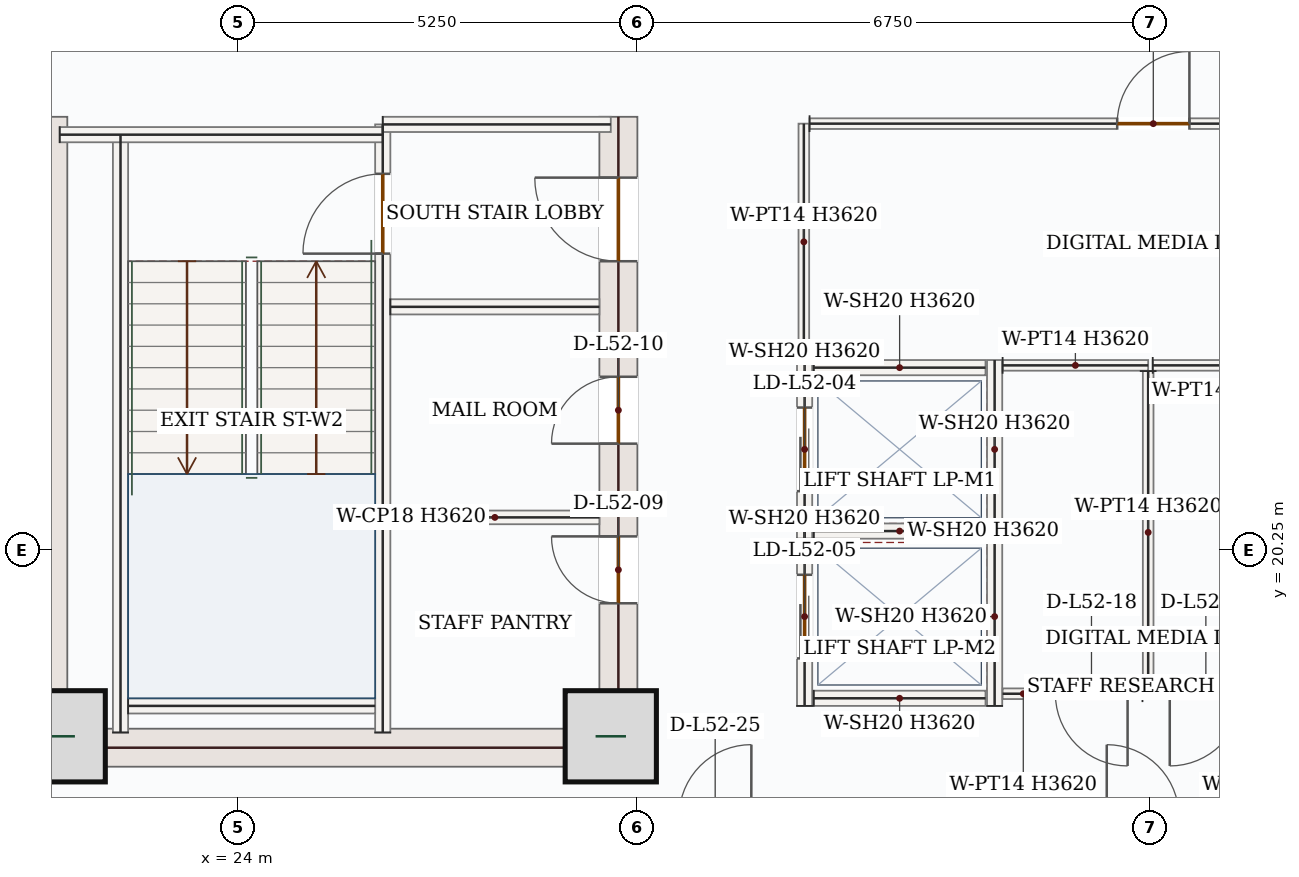
"""IFC4 building model, lengths in metres.
Left out: names, types, materials, properties, quantities, classifications, styles, units other than length and angle.
Written with IfcOpenShell. Run it as: python <this file> out.ifc"""

import sys

from ifc_helpers import new_model, si_unit, direction, frame, frame_2d, origin, origin_2d, place, context, subcontext, project, spatial, rectangle, extrude, source, transform, mapped, element, fill, save


model = new_model("IFC4")
c1 = context("Model", 3, precision=1e-05, world=origin(), true_north=direction((0.0, 1.0)))
c2 = subcontext(c1, "Body", "Model", "MODEL_VIEW")
j1 = project(units=[si_unit("LENGTHUNIT", "METRE"), si_unit("PLANEANGLEUNIT", "RADIAN")], contexts=[c1])
p1 = place(None, origin())
s1 = spatial("IfcSite", under=j1, at=p1, CompositionType="ELEMENT")
p2 = place(p1, origin())
s2 = spatial("IfcBuilding", under=s1, at=p2, CompositionType="ELEMENT")
p3 = place(p2, frame((0.0, 0.0, 221.4)))
s3 = spatial("IfcBuildingStorey", under=s2, at=p3, CompositionType="ELEMENT", Elevation=221.4)
m1 = source(origin(), c2, "Body", "SweptSolid", [
    extrude(rectangle(XDim=8.55, YDim=0.5, at=frame_2d((4.275, 0.0))), origin(), (0.0, 0.0, 1.0), 3.62),
])
p4 = place(p3, frame((21.5, 17.4, 0.0), z_axis=(0.0, 0.0, 1.0), x_axis=(0.0, 1.0, 0.0)))
e1 = element("IfcWall", 1, at=p4, inside=s3, PredefinedType="SHEAR", context=c2, shape_type="MappedRepresentation", body=[
    mapped(m1, transform((0.0, 0.0, 0.0), x_axis=(1.0, 0.0, 0.0), y_axis=(0.0, 1.0, 0.0), z_axis=(0.0, 0.0, 1.0), scale=1.0)),
])
p5 = place(p3, frame((29.0, 17.4, 0.0), z_axis=(0.0, 0.0, 1.0), x_axis=(0.0, 1.0, 0.0)))
e2 = element("IfcWall", 2, at=p5, inside=s3, PredefinedType="SHEAR", context=c2, shape_type="SweptSolid", body=[
    extrude(rectangle(XDim=8.55, YDim=0.5, at=frame_2d((4.275, 0.0))), origin(), (0.0, 0.0, 1.0), 3.62),
])
p6 = place(p5, frame((6.65, 0.0, 0.0)))
e3 = element("IfcOpeningElement", 3, at=p6, cuts=e2, PredefinedType="OPENING", context=c2, shape_type="SweptSolid", body=[
    extrude(rectangle(XDim=1.1, YDim=2.2, at=frame_2d((0.55, 1.1))), frame((0.0, 0.26, 0.0), z_axis=(0.0, -1.0, 0.0), x_axis=(1.0, 0.0, 0.0)), (0.0, 0.0, 1.0), 0.52),
])
p7 = place(p5, frame((2.15, 0.0, 0.0)))
e4 = element("IfcOpeningElement", 4, at=p7, cuts=e2, PredefinedType="OPENING", context=c2, shape_type="SweptSolid", body=[
    extrude(rectangle(XDim=0.88, YDim=2.1, at=frame_2d((0.44, 1.05))), frame((0.0, 0.26, 0.0), z_axis=(0.0, -1.0, 0.0), x_axis=(1.0, 0.0, 0.0)), (0.0, 0.0, 1.0), 0.52),
])
p8 = place(p5, frame((4.25, 0.0, 0.0)))
e5 = element("IfcOpeningElement", 5, at=p8, cuts=e2, PredefinedType="OPENING", context=c2, shape_type="SweptSolid", body=[
    extrude(rectangle(XDim=0.88, YDim=2.1, at=frame_2d((0.44, 1.05))), frame((0.0, 0.26, 0.0), z_axis=(0.0, -1.0, 0.0), x_axis=(1.0, 0.0, 0.0)), (0.0, 0.0, 1.0), 0.52),
])
m2 = source(origin(), c2, "Body", "SweptSolid", [
    extrude(rectangle(XDim=7.0, YDim=0.5, at=frame_2d((3.5, 0.0))), origin(), (0.0, 0.0, 1.0), 3.62),
])
p9 = place(p3, frame((21.75, 17.65, 0.0), z_axis=(0.0, 0.0, 1.0), x_axis=(1.0, 0.0, 0.0)))
e6 = element("IfcWall", 6, at=p9, inside=s3, PredefinedType="SHEAR", context=c2, shape_type="MappedRepresentation", body=[
    mapped(m2, transform((0.0, 0.0, 0.0), x_axis=(1.0, 0.0, 0.0), y_axis=(0.0, 1.0, 0.0), z_axis=(0.0, 0.0, 1.0), scale=1.0)),
])
m3 = source(origin(), c2, "Body", "SweptSolid", [
    extrude(rectangle(XDim=1.2, YDim=1.2, at=origin_2d()), origin(), (0.0, 0.0, 1.0), 3.9),
])
for number, where, z_axis, x_axis in (
    (7, (21.65, 17.8, 0.0), (0.0, 0.0, 1.0), (1.0, 0.0, 0.0)),
    (8, (28.9, 17.8, 0.0), (0.0, 0.0, 1.0), (1.0, 0.0, 0.0)),
):
    element("IfcColumn", number, at=place(p3, frame(where, z_axis=z_axis, x_axis=x_axis)), inside=s3, PredefinedType="COLUMN", context=c2, shape_type="MappedRepresentation", body=[
        mapped(m3, transform((0.0, 0.0, 0.0), x_axis=(1.0, 0.0, 0.0), y_axis=(0.0, 1.0, 0.0), z_axis=(0.0, 0.0, 1.0), scale=1.0)),
    ])
m4 = source(origin(), c2, "Body", "SweptSolid", [
    extrude(rectangle(XDim=7.87, YDim=0.2, at=frame_2d((3.935, 0.0))), origin(), (0.0, 0.0, 1.0), 3.62),
])
p10 = place(p3, frame((22.45, 17.85, 0.0), z_axis=(0.0, 0.0, 1.0), x_axis=(0.0, 1.0, 0.0)))
e9 = element("IfcWall", 9, at=p10, inside=s3, PredefinedType="SOLIDWALL", context=c2, shape_type="MappedRepresentation", body=[
    mapped(m4, transform((0.0, 0.0, 0.0), x_axis=(1.0, 0.0, 0.0), y_axis=(0.0, 1.0, 0.0), z_axis=(0.0, 0.0, 1.0), scale=1.0)),
])
p11 = place(p3, frame((25.9, 17.85, 0.0), z_axis=(0.0, 0.0, 1.0), x_axis=(0.0, 1.0, 0.0)))
e10 = element("IfcWall", 10, at=p11, inside=s3, PredefinedType="SOLIDWALL", context=c2, shape_type="SweptSolid", body=[
    extrude(rectangle(XDim=8.0, YDim=0.2, at=frame_2d((4.0, 0.0))), origin(), (0.0, 0.0, 1.0), 3.62),
])
p12 = place(p11, frame((6.3, 0.0, 0.0)))
e11 = element("IfcOpeningElement", 11, at=p12, cuts=e10, PredefinedType="OPENING", context=c2, shape_type="SweptSolid", body=[
    extrude(rectangle(XDim=1.05, YDim=2.15, at=frame_2d((0.525, 1.075))), frame((0.0, 0.11, 0.0), z_axis=(0.0, -1.0, 0.0), x_axis=(1.0, 0.0, 0.0)), (0.0, 0.0, 1.0), 0.22),
])
m5 = source(origin(), c2, "Body", "SweptSolid", [
    extrude(rectangle(XDim=4.25, YDim=0.2, at=frame_2d((2.125, 0.0))), origin(), (0.0, 0.0, 1.0), 3.62),
])
p13 = place(p3, frame((21.65, 25.715, 0.0), z_axis=(0.0, 0.0, 1.0), x_axis=(1.0, 0.0, 0.0)))
e12 = element("IfcWall", 12, at=p13, inside=s3, PredefinedType="SOLIDWALL", context=c2, shape_type="MappedRepresentation", body=[
    mapped(m5, transform((0.0, 0.0, 0.0), x_axis=(1.0, 0.0, 0.0), y_axis=(0.0, 1.0, 0.0), z_axis=(0.0, 0.0, 1.0), scale=1.0)),
])
m6 = source(origin(), c2, "Body", "SweptSolid", [
    extrude(rectangle(XDim=3.0, YDim=0.2, at=frame_2d((1.5, 0.0))), origin(), (0.0, 0.0, 1.0), 3.62),
])
p14 = place(p3, frame((25.9, 25.85, 0.0), z_axis=(0.0, 0.0, 1.0), x_axis=(1.0, 0.0, 0.0)))
e13 = element("IfcWall", 13, at=p14, inside=s3, PredefinedType="SOLIDWALL", context=c2, shape_type="MappedRepresentation", body=[
    mapped(m6, transform((0.0, 0.0, 0.0), x_axis=(1.0, 0.0, 0.0), y_axis=(0.0, 1.0, 0.0), z_axis=(0.0, 0.0, 1.0), scale=1.0)),
])
m7 = source(origin(), c2, "Body", "SweptSolid", [
    extrude(rectangle(XDim=3.25, YDim=0.2, at=frame_2d((1.625, 0.0))), origin(), (0.0, 0.0, 1.0), 3.62),
])
p15 = place(p3, frame((22.55, 18.2, 0.0), z_axis=(0.0, 0.0, 1.0), x_axis=(1.0, 0.0, 0.0)))
e14 = element("IfcWall", 14, at=p15, inside=s3, PredefinedType="SOLIDWALL", context=c2, shape_type="MappedRepresentation", body=[
    mapped(m7, transform((0.0, 0.0, 0.0), x_axis=(1.0, 0.0, 0.0), y_axis=(0.0, 1.0, 0.0), z_axis=(0.0, 0.0, 1.0), scale=1.0)),
])
m8 = source(origin(), c2, "Body", "SweptSolid", [
    extrude(rectangle(XDim=2.75, YDim=0.2, at=frame_2d((1.375, 0.0))), origin(), (0.0, 0.0, 1.0), 3.62),
])
p16 = place(p3, frame((26.0, 23.45, 0.0), z_axis=(0.0, 0.0, 1.0), x_axis=(1.0, 0.0, 0.0)))
e15 = element("IfcWall", 15, at=p16, inside=s3, PredefinedType="SOLIDWALL", context=c2, shape_type="MappedRepresentation", body=[
    mapped(m8, transform((0.0, 0.0, 0.0), x_axis=(1.0, 0.0, 0.0), y_axis=(0.0, 1.0, 0.0), z_axis=(0.0, 0.0, 1.0), scale=1.0)),
])
m9 = source(origin(), c2, "Body", "SweptSolid", [
    extrude(rectangle(XDim=2.75, YDim=0.18, at=frame_2d((1.375, 0.0))), origin(), (0.0, 0.0, 1.0), 3.62),
])
p17 = place(p3, frame((26.0, 20.68, 0.0), z_axis=(0.0, 0.0, 1.0), x_axis=(1.0, 0.0, 0.0)))
e16 = element("IfcWall", 16, at=p17, inside=s3, PredefinedType="PARTITIONING", context=c2, shape_type="MappedRepresentation", body=[
    mapped(m9, transform((0.0, 0.0, 0.0), x_axis=(1.0, 0.0, 0.0), y_axis=(0.0, 1.0, 0.0), z_axis=(0.0, 0.0, 1.0), scale=1.0)),
])
p18 = place(p3, frame((31.45, 20.4, 0.0), z_axis=(0.0, 0.0, 1.0), x_axis=(0.0, 1.0, 0.0)))
e17 = element("IfcWall", 17, at=p18, inside=s3, PredefinedType="SOLIDWALL", context=c2, shape_type="SweptSolid", body=[
    extrude(rectangle(XDim=2.35, YDim=0.2, at=frame_2d((1.175, 0.0))), origin(), (0.0, 0.0, 1.0), 3.62),
])
p19 = place(p18, frame((0.625, 0.0, 0.0)))
e18 = element("IfcOpeningElement", 18, at=p19, cuts=e17, PredefinedType="OPENING", context=c2, shape_type="SweptSolid", body=[
    extrude(rectangle(XDim=1.1, YDim=2.15, at=frame_2d((0.55, 1.075))), frame((0.0, 0.11, 0.0), z_axis=(0.0, -1.0, 0.0), x_axis=(1.0, 0.0, 0.0)), (0.0, 0.0, 1.0), 0.22),
])
m10 = source(origin(), c2, "Body", "SweptSolid", [
    extrude(rectangle(XDim=2.35, YDim=0.2, at=frame_2d((1.175, 0.0))), origin(), (0.0, 0.0, 1.0), 3.62),
])
p20 = place(p3, frame((33.95, 20.4, 0.0), z_axis=(0.0, 0.0, 1.0), x_axis=(0.0, 1.0, 0.0)))
e19 = element("IfcWall", 19, at=p20, inside=s3, PredefinedType="SOLIDWALL", context=c2, shape_type="MappedRepresentation", body=[
    mapped(m10, transform((0.0, 0.0, 0.0), x_axis=(1.0, 0.0, 0.0), y_axis=(0.0, 1.0, 0.0), z_axis=(0.0, 0.0, 1.0), scale=1.0)),
])
m11 = source(origin(), c2, "Body", "SweptSolid", [
    extrude(rectangle(XDim=2.26, YDim=0.2, at=frame_2d((1.13, 0.0))), origin(), (0.0, 0.0, 1.0), 3.62),
])
for number, where, z_axis, x_axis in (
    (20, (31.57, 20.5, 0.0), (0.0, 0.0, 1.0), (1.0, 0.0, 0.0)),
    (21, (31.57, 22.65, 0.0), (0.0, 0.0, 1.0), (1.0, 0.0, 0.0)),
):
    element("IfcWall", number, at=place(p3, frame(where, z_axis=z_axis, x_axis=x_axis)), inside=s3, PredefinedType="SOLIDWALL", context=c2, shape_type="MappedRepresentation", body=[
        mapped(m11, transform((0.0, 0.0, 0.0), x_axis=(1.0, 0.0, 0.0), y_axis=(0.0, 1.0, 0.0), z_axis=(0.0, 0.0, 1.0), scale=1.0)),
    ])
p21 = place(p3, frame((31.45, 18.2, 0.0), z_axis=(0.0, 0.0, 1.0), x_axis=(0.0, 1.0, 0.0)))
e22 = element("IfcWall", 22, at=p21, inside=s3, PredefinedType="SOLIDWALL", context=c2, shape_type="SweptSolid", body=[
    extrude(rectangle(XDim=2.35, YDim=0.2, at=frame_2d((1.175, 0.0))), origin(), (0.0, 0.0, 1.0), 3.62),
])
p22 = place(p21, frame((0.625, 0.0, 0.0)))
e23 = element("IfcOpeningElement", 23, at=p22, cuts=e22, PredefinedType="OPENING", context=c2, shape_type="SweptSolid", body=[
    extrude(rectangle(XDim=1.1, YDim=2.15, at=frame_2d((0.55, 1.075))), frame((0.0, 0.11, 0.0), z_axis=(0.0, -1.0, 0.0), x_axis=(1.0, 0.0, 0.0)), (0.0, 0.0, 1.0), 0.22),
])
p23 = place(p3, frame((33.95, 18.2, 0.0), z_axis=(0.0, 0.0, 1.0), x_axis=(0.0, 1.0, 0.0)))
e24 = element("IfcWall", 24, at=p23, inside=s3, PredefinedType="SOLIDWALL", context=c2, shape_type="MappedRepresentation", body=[
    mapped(m10, transform((0.0, 0.0, 0.0), x_axis=(1.0, 0.0, 0.0), y_axis=(0.0, 1.0, 0.0), z_axis=(0.0, 0.0, 1.0), scale=1.0)),
])
p24 = place(p3, frame((31.57, 18.3, 0.0), z_axis=(0.0, 0.0, 1.0), x_axis=(1.0, 0.0, 0.0)))
e25 = element("IfcWall", 25, at=p24, inside=s3, PredefinedType="SOLIDWALL", context=c2, shape_type="MappedRepresentation", body=[
    mapped(m11, transform((0.0, 0.0, 0.0), x_axis=(1.0, 0.0, 0.0), y_axis=(0.0, 1.0, 0.0), z_axis=(0.0, 0.0, 1.0), scale=1.0)),
])
m12 = source(origin(), c2, "Body", "SweptSolid", [
    extrude(rectangle(XDim=1.915, YDim=0.14, at=frame_2d((0.958, 0.0))), origin(), (0.0, 0.0, 1.0), 3.62),
])
p25 = place(p3, frame((34.055, 22.68, 0.0), z_axis=(0.0, 0.0, 1.0), x_axis=(1.0, 0.0, 0.0)))
e26 = element("IfcWall", 26, at=p25, inside=s3, PredefinedType="PARTITIONING", context=c2, shape_type="MappedRepresentation", body=[
    mapped(m12, transform((0.0, 0.0, 0.0), x_axis=(1.0, 0.0, 0.0), y_axis=(0.0, 1.0, 0.0), z_axis=(0.0, 0.0, 1.0), scale=1.0)),
])
m13 = source(origin(), c2, "Body", "SweptSolid", [
    extrude(rectangle(XDim=4.245, YDim=0.14, at=frame_2d((2.123, 0.0))), origin(), (0.0, 0.0, 1.0), 3.62),
])
p26 = place(p3, frame((35.97, 22.605, 0.0), z_axis=(0.0, 0.0, 1.0), x_axis=(0.0, -1.0, 0.0)))
e27 = element("IfcWall", 27, at=p26, inside=s3, PredefinedType="PARTITIONING", context=c2, shape_type="MappedRepresentation", body=[
    mapped(m13, transform((0.0, 0.0, 0.0), x_axis=(1.0, 0.0, 0.0), y_axis=(0.0, 1.0, 0.0), z_axis=(0.0, 0.0, 1.0), scale=1.0)),
])
p27 = place(p3, frame((35.895, 18.36, 0.0), z_axis=(0.0, 0.0, 1.0), x_axis=(-1.0, 0.0, 0.0)))
e28 = element("IfcWall", 28, at=p27, inside=s3, PredefinedType="PARTITIONING", context=c2, shape_type="SweptSolid", body=[
    extrude(rectangle(XDim=1.84, YDim=0.14, at=frame_2d((0.92, 0.0))), origin(), (0.0, 0.0, 1.0), 3.62),
])
p28 = place(p27, frame((0.196, 0.0, 0.0)))
e29 = element("IfcOpeningElement", 29, at=p28, cuts=e28, PredefinedType="OPENING", context=c2, shape_type="SweptSolid", body=[
    extrude(rectangle(XDim=0.95, YDim=2.15, at=frame_2d((0.475, 1.075))), frame((0.0, 0.08, 0.0), z_axis=(0.0, -1.0, 0.0), x_axis=(1.0, 0.0, 0.0)), (0.0, 0.0, 1.0), 0.16),
])
p29 = place(p3, frame((36.03, 22.68, 0.0), z_axis=(0.0, 0.0, 1.0), x_axis=(1.0, 0.0, 0.0)))
e30 = element("IfcWall", 30, at=p29, inside=s3, PredefinedType="PARTITIONING", context=c2, shape_type="MappedRepresentation", body=[
    mapped(m12, transform((0.0, 0.0, 0.0), x_axis=(1.0, 0.0, 0.0), y_axis=(0.0, 1.0, 0.0), z_axis=(0.0, 0.0, 1.0), scale=1.0)),
])
p30 = place(p3, frame((37.945, 18.36, 0.0), z_axis=(0.0, 0.0, 1.0), x_axis=(-1.0, 0.0, 0.0)))
e31 = element("IfcWall", 31, at=p30, inside=s3, PredefinedType="PARTITIONING", context=c2, shape_type="SweptSolid", body=[
    extrude(rectangle(XDim=1.9, YDim=0.14, at=frame_2d((0.95, 0.0))), origin(), (0.0, 0.0, 1.0), 3.62),
])
p31 = place(p30, frame((0.741, 0.0, 0.0)))
e32 = element("IfcOpeningElement", 32, at=p31, cuts=e31, PredefinedType="OPENING", context=c2, shape_type="SweptSolid", body=[
    extrude(rectangle(XDim=0.95, YDim=2.15, at=frame_2d((0.475, 1.075))), frame((0.0, 0.08, 0.0), z_axis=(0.0, -1.0, 0.0), x_axis=(1.0, 0.0, 0.0)), (0.0, 0.0, 1.0), 0.16),
])
m14 = source(origin(), c2, "Body", "SweptSolid", [
    extrude(rectangle(XDim=3.11, YDim=0.14, at=frame_2d((1.555, 0.0))), origin(), (0.0, 0.0, 1.0), 3.62),
])
p32 = place(p3, frame((31.44, 22.75, 0.0), z_axis=(0.0, 0.0, 1.0), x_axis=(0.0, 1.0, 0.0)))
e33 = element("IfcWall", 33, at=p32, inside=s3, PredefinedType="PARTITIONING", context=c2, shape_type="MappedRepresentation", body=[
    mapped(m14, transform((0.0, 0.0, 0.0), x_axis=(1.0, 0.0, 0.0), y_axis=(0.0, 1.0, 0.0), z_axis=(0.0, 0.0, 1.0), scale=1.0)),
])
p33 = place(p3, frame((31.515, 25.86, 0.0), z_axis=(0.0, 0.0, 1.0), x_axis=(1.0, 0.0, 0.0)))
e34 = element("IfcWall", 34, at=p33, inside=s3, PredefinedType="PARTITIONING", context=c2, shape_type="SweptSolid", body=[
    extrude(rectangle(XDim=9.045, YDim=0.14, at=frame_2d((4.522, 0.0))), origin(), (0.0, 0.0, 1.0), 3.62),
])
p34 = place(p33, frame((4.048, 0.0, 0.0)))
e35 = element("IfcOpeningElement", 35, at=p34, cuts=e34, PredefinedType="OPENING", context=c2, shape_type="SweptSolid", body=[
    extrude(rectangle(XDim=0.95, YDim=2.15, at=frame_2d((0.475, 1.075))), frame((0.0, 0.08, 0.0), z_axis=(0.0, -1.0, 0.0), x_axis=(1.0, 0.0, 0.0)), (0.0, 0.0, 1.0), 0.16),
])
m15 = source(origin(), c2, "Body", "SweptSolid", [
    extrude(rectangle(XDim=1.05, YDim=2.15, at=frame_2d((0.525, 1.075))), frame((0.0, 0.025, 0.0), z_axis=(0.0, -1.0, 0.0), x_axis=(1.0, 0.0, 0.0)), (0.0, 0.0, 1.0), 0.05),
])
p35 = place(p12, origin())
e36 = element("IfcDoor", 36, at=p35, inside=s3, OperationType="SINGLE_SWING_LEFT", PredefinedType="DOOR", context=c2, shape_type="MappedRepresentation", body=[
    mapped(m15, transform((0.0, 0.0, 0.0), x_axis=(1.0, 0.0, 0.0), y_axis=(0.0, 1.0, 0.0), z_axis=(0.0, 0.0, 1.0), scale=1.0)),
])
fill(e11, e36)
m16 = source(origin(), c2, "Body", "SweptSolid", [
    extrude(rectangle(XDim=1.1, YDim=2.2, at=frame_2d((0.55, 1.1))), frame((0.0, 0.025, 0.0), z_axis=(0.0, -1.0, 0.0), x_axis=(1.0, 0.0, 0.0)), (0.0, 0.0, 1.0), 0.05),
])
p36 = place(p6, origin())
e37 = element("IfcDoor", 37, at=p36, inside=s3, OperationType="SINGLE_SWING_RIGHT", PredefinedType="DOOR", context=c2, shape_type="MappedRepresentation", body=[
    mapped(m16, transform((0.0, 0.0, 0.0), x_axis=(1.0, 0.0, 0.0), y_axis=(0.0, 1.0, 0.0), z_axis=(0.0, 0.0, 1.0), scale=1.0)),
])
fill(e3, e37)
m17 = source(origin(), c2, "Body", "SweptSolid", [
    extrude(rectangle(XDim=0.88, YDim=2.1, at=frame_2d((0.44, 1.05))), frame((0.0, 0.025, 0.0), z_axis=(0.0, -1.0, 0.0), x_axis=(1.0, 0.0, 0.0)), (0.0, 0.0, 1.0), 0.05),
])
p37 = place(p7, origin())
e38 = element("IfcDoor", 38, at=p37, inside=s3, OperationType="SINGLE_SWING_RIGHT", PredefinedType="DOOR", context=c2, shape_type="MappedRepresentation", body=[
    mapped(m17, transform((0.0, 0.0, 0.0), x_axis=(1.0, 0.0, 0.0), y_axis=(0.0, 1.0, 0.0), z_axis=(0.0, 0.0, 1.0), scale=1.0)),
])
fill(e4, e38)
p38 = place(p8, origin())
e39 = element("IfcDoor", 39, at=p38, inside=s3, OperationType="SINGLE_SWING_LEFT", PredefinedType="DOOR", context=c2, shape_type="MappedRepresentation", body=[
    mapped(m17, transform((0.0, 0.0, 0.0), x_axis=(1.0, 0.0, 0.0), y_axis=(0.0, 1.0, 0.0), z_axis=(0.0, 0.0, 1.0), scale=1.0)),
])
fill(e5, e39)
m18 = source(origin(), c2, "Body", "SweptSolid", [
    extrude(rectangle(XDim=1.1, YDim=2.15, at=frame_2d((0.55, 1.075))), frame((0.0, 0.025, 0.0), z_axis=(0.0, -1.0, 0.0), x_axis=(1.0, 0.0, 0.0)), (0.0, 0.0, 1.0), 0.05),
])
p39 = place(p19, origin())
e40 = element("IfcDoor", 40, at=p39, inside=s3, OperationType="DOUBLE_DOOR_SLIDING", PredefinedType="DOOR", context=c2, shape_type="MappedRepresentation", body=[
    mapped(m18, transform((0.0, 0.0, 0.0), x_axis=(1.0, 0.0, 0.0), y_axis=(0.0, 1.0, 0.0), z_axis=(0.0, 0.0, 1.0), scale=1.0)),
])
fill(e18, e40)
p40 = place(p22, origin())
e41 = element("IfcDoor", 41, at=p40, inside=s3, OperationType="DOUBLE_DOOR_SLIDING", PredefinedType="DOOR", context=c2, shape_type="MappedRepresentation", body=[
    mapped(m18, transform((0.0, 0.0, 0.0), x_axis=(1.0, 0.0, 0.0), y_axis=(0.0, 1.0, 0.0), z_axis=(0.0, 0.0, 1.0), scale=1.0)),
])
fill(e23, e41)
m19 = source(origin(), c2, "Body", "SweptSolid", [
    extrude(rectangle(XDim=0.95, YDim=2.15, at=frame_2d((0.475, 1.075))), frame((0.0, 0.025, 0.0), z_axis=(0.0, -1.0, 0.0), x_axis=(1.0, 0.0, 0.0)), (0.0, 0.0, 1.0), 0.05),
])
p41 = place(p34, origin())
e42 = element("IfcDoor", 42, at=p41, inside=s3, OperationType="SINGLE_SWING_RIGHT", PredefinedType="DOOR", context=c2, shape_type="MappedRepresentation", body=[
    mapped(m19, transform((0.0, 0.0, 0.0), x_axis=(1.0, 0.0, 0.0), y_axis=(0.0, 1.0, 0.0), z_axis=(0.0, 0.0, 1.0), scale=1.0)),
])
fill(e35, e42)
p42 = place(p28, origin())
e43 = element("IfcDoor", 43, at=p42, inside=s3, OperationType="SINGLE_SWING_LEFT", PredefinedType="DOOR", context=c2, shape_type="MappedRepresentation", body=[
    mapped(m19, transform((0.0, 0.0, 0.0), x_axis=(1.0, 0.0, 0.0), y_axis=(0.0, 1.0, 0.0), z_axis=(0.0, 0.0, 1.0), scale=1.0)),
])
fill(e29, e43)
p43 = place(p31, origin())
e44 = element("IfcDoor", 44, at=p43, inside=s3, OperationType="SINGLE_SWING_RIGHT", PredefinedType="DOOR", context=c2, shape_type="MappedRepresentation", body=[
    mapped(m19, transform((0.0, 0.0, 0.0), x_axis=(1.0, 0.0, 0.0), y_axis=(0.0, 1.0, 0.0), z_axis=(0.0, 0.0, 1.0), scale=1.0)),
])
fill(e32, e44)
save(model, sys.argv[1])
